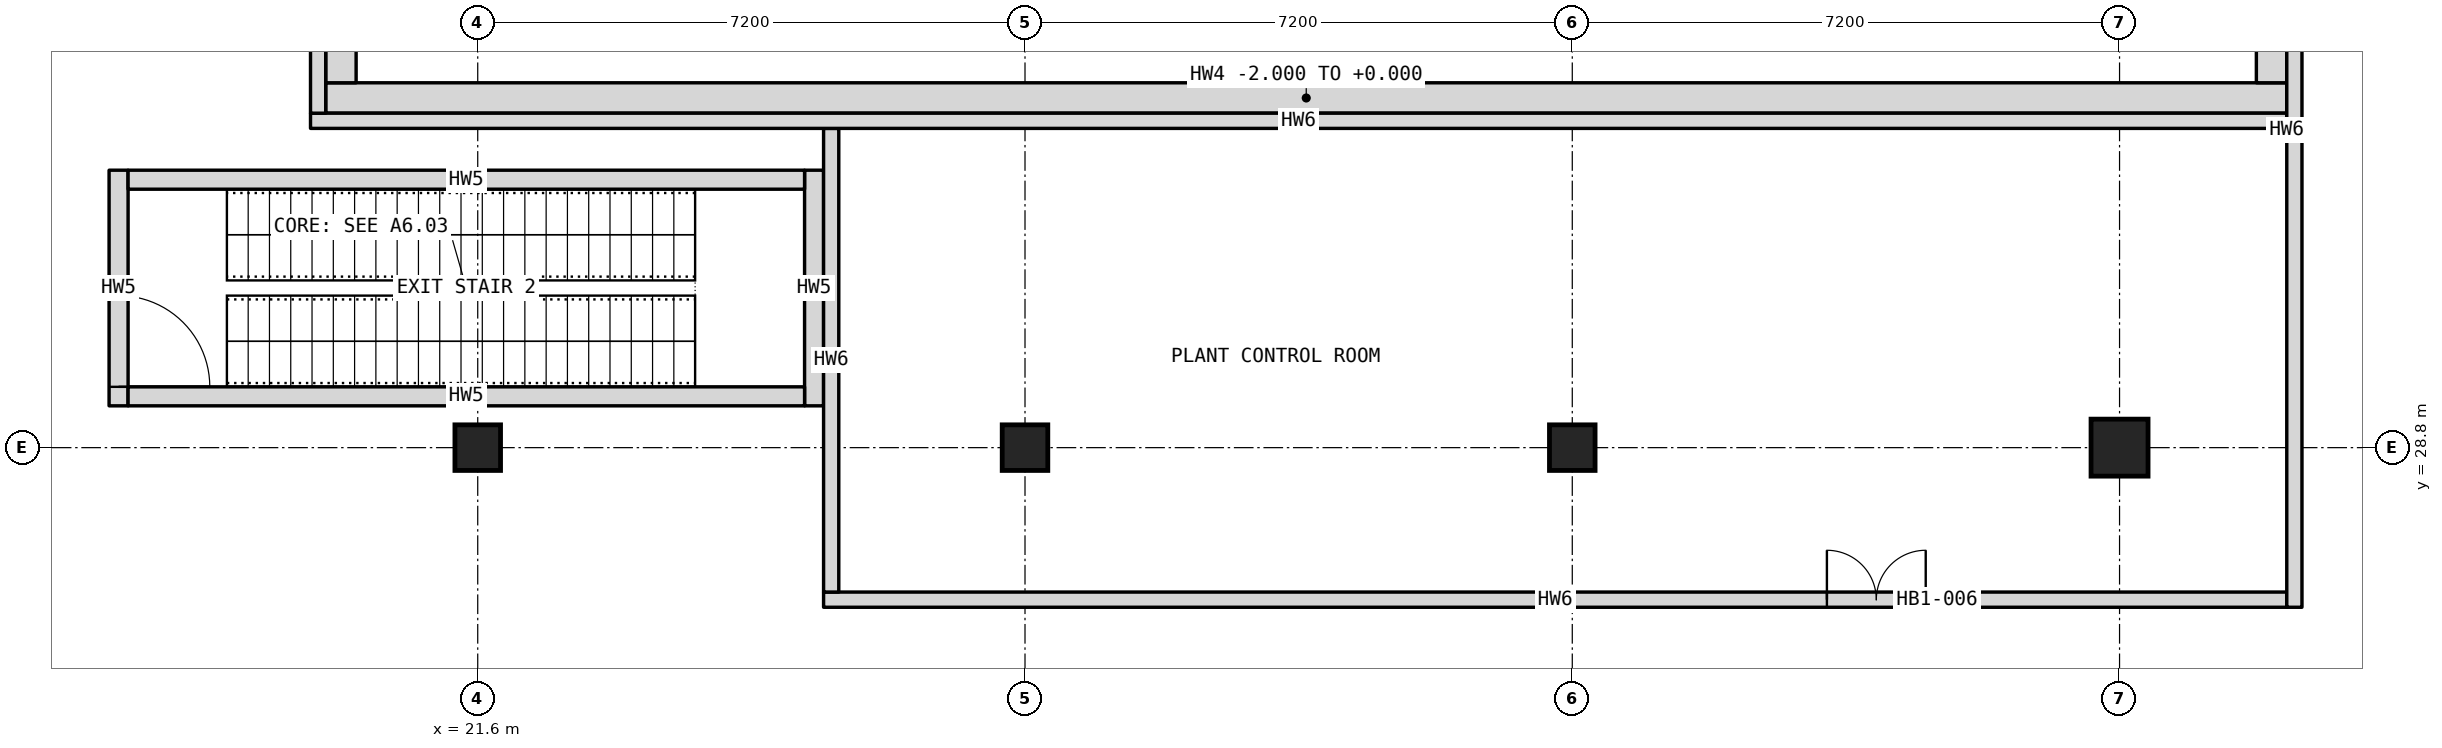
"""IFC4 building model, lengths in metres.
Left out: names, types, materials, properties, quantities, classifications, styles, units other than length and angle.
Written with IfcOpenShell. Run it as: python <this file> out.ifc"""

import sys

from ifc_helpers import new_model, si_unit, direction, frame, frame_2d, origin, origin_2d, place, context, subcontext, project, spatial, rectangle, extrude, element, fill, save


model = new_model("IFC4")
c1 = context("Model", 3, precision=1e-05, world=origin(), true_north=direction((0.0, 1.0)))
c2 = subcontext(c1, "Body", "Model", "MODEL_VIEW")
j1 = project(units=[si_unit("LENGTHUNIT", "METRE"), si_unit("PLANEANGLEUNIT", "RADIAN")], contexts=[c1])
p1 = place(None, origin())
s1 = spatial("IfcSite", under=j1, at=p1, CompositionType="ELEMENT")
p2 = place(p1, origin())
s2 = spatial("IfcBuilding", under=s1, at=p2, CompositionType="ELEMENT")
p3 = place(p2, frame((0.0, 0.0, -8.0)))
s3 = spatial("IfcBuildingStorey", under=s2, at=p3, CompositionType="ELEMENT", Elevation=-8.0)
for number, where, z_axis, x_axis in (
    (1, (21.6, 28.8, 0.0), (0.0, 0.0, 1.0), (1.0, 0.0, 0.0)),
    (2, (28.8, 28.8, 0.0), (0.0, 0.0, 1.0), (1.0, 0.0, 0.0)),
    (3, (36.0, 28.8, 0.0), (0.0, 0.0, 1.0), (1.0, 0.0, 0.0)),
):
    element("IfcColumn", number, at=place(p3, frame(where, z_axis=z_axis, x_axis=x_axis)), inside=s3, PredefinedType="COLUMN", context=c2, shape_type="SweptSolid", body=[
        extrude(rectangle(XDim=0.6, YDim=0.6, at=origin_2d()), origin(), (0.0, 0.0, 1.0), 7.595),
    ])
p4 = place(p3, frame((43.2, 28.8, 0.0), z_axis=(0.0, 0.0, 1.0), x_axis=(1.0, 0.0, 0.0)))
e4 = element("IfcColumn", 4, at=p4, inside=s3, PredefinedType="COLUMN", context=c2, shape_type="SweptSolid", body=[
    extrude(rectangle(XDim=0.75, YDim=0.75, at=origin_2d()), origin(), (0.0, 0.0, 1.0), 7.595),
])
p5 = place(p3, frame((19.6, 33.4, 6.0), z_axis=(0.0, 0.0, 1.0), x_axis=(1.0, 0.0, 0.0)))
e5 = element("IfcWall", 5, at=p5, inside=s3, PredefinedType="SOLIDWALL", context=c2, shape_type="SweptSolid", body=[
    extrude(rectangle(XDim=25.8, YDim=0.4, at=frame_2d((12.9, 0.0))), origin(), (0.0, 0.0, 1.0), 2.0),
])
for number, where, z_axis, x_axis in (
    (6, (19.8, 33.6, 6.0), (0.0, 0.0, 1.0), (0.0, 1.0, 0.0)),
    (7, (45.2, 33.6, 6.0), (0.0, 0.0, 1.0), (0.0, 1.0, 0.0)),
):
    element("IfcWall", number, at=place(p3, frame(where, z_axis=z_axis, x_axis=x_axis)), inside=s3, PredefinedType="SOLIDWALL", context=c2, shape_type="SweptSolid", body=[
        extrude(rectangle(XDim=20.0, YDim=0.4, at=frame_2d((10.0, 0.0))), origin(), (0.0, 0.0, 1.0), 2.0),
    ])
p6 = place(p3, frame((16.875, 29.35, 0.0), z_axis=(0.0, 0.0, 1.0), x_axis=(0.0, 1.0, 0.0)))
e8 = element("IfcWall", 8, at=p6, inside=s3, PredefinedType="SOLIDWALL", context=c2, shape_type="SweptSolid", body=[
    extrude(rectangle(XDim=3.1, YDim=0.25, at=frame_2d((1.55, 0.0))), origin(), (0.0, 0.0, 1.0), 7.595),
])
p7 = place(p6, frame((0.25, 0.0, 0.0)))
e9 = element("IfcOpeningElement", 9, at=p7, cuts=e8, PredefinedType="OPENING", context=c2, shape_type="SweptSolid", body=[
    extrude(rectangle(XDim=1.2, YDim=2.1, at=frame_2d((0.6, 1.05))), frame((0.0, 0.135, 0.0), z_axis=(0.0, -1.0, 0.0), x_axis=(1.0, 0.0, 0.0)), (0.0, 0.0, 1.0), 0.27),
])
p8 = place(p3, frame((26.025, 29.35, 0.0), z_axis=(0.0, 0.0, 1.0), x_axis=(0.0, 1.0, 0.0)))
e10 = element("IfcWall", 10, at=p8, inside=s3, PredefinedType="SOLIDWALL", context=c2, shape_type="SweptSolid", body=[
    extrude(rectangle(XDim=3.1, YDim=0.25, at=frame_2d((1.55, 0.0))), origin(), (0.0, 0.0, 1.0), 7.595),
])
for number, where, z_axis, x_axis in (
    (11, (17.0, 29.475, 0.0), (0.0, 0.0, 1.0), (1.0, 0.0, 0.0)),
    (12, (17.0, 32.325, 0.0), (0.0, 0.0, 1.0), (1.0, 0.0, 0.0)),
):
    element("IfcWall", number, at=place(p3, frame(where, z_axis=z_axis, x_axis=x_axis)), inside=s3, PredefinedType="SOLIDWALL", context=c2, shape_type="SweptSolid", body=[
        extrude(rectangle(XDim=8.9, YDim=0.25, at=frame_2d((4.45, 0.0))), origin(), (0.0, 0.0, 1.0), 7.595),
    ])
p9 = place(p3, frame((26.15, 26.8, 0.0), z_axis=(0.0, 0.0, 1.0), x_axis=(1.0, 0.0, 0.0)))
e13 = element("IfcWall", 13, at=p9, inside=s3, PredefinedType="PARTITIONING", context=c2, shape_type="SweptSolid", body=[
    extrude(rectangle(XDim=19.25, YDim=0.2, at=frame_2d((9.625, 0.0))), origin(), (0.0, 0.0, 1.0), 7.595),
])
p10 = place(p9, frame((13.2, 0.0, 0.0)))
e14 = element("IfcOpeningElement", 14, at=p10, cuts=e13, PredefinedType="OPENING", context=c2, shape_type="SweptSolid", body=[
    extrude(rectangle(XDim=1.3, YDim=2.1, at=frame_2d((0.65, 1.05))), frame((0.0, 0.11, 0.0), z_axis=(0.0, -1.0, 0.0), x_axis=(1.0, 0.0, 0.0)), (0.0, 0.0, 1.0), 0.22),
])
p11 = place(p3, frame((26.25, 26.9, 0.0), z_axis=(0.0, 0.0, 1.0), x_axis=(0.0, 1.0, 0.0)))
e15 = element("IfcWall", 15, at=p11, inside=s3, PredefinedType="PARTITIONING", context=c2, shape_type="SweptSolid", body=[
    extrude(rectangle(XDim=6.1, YDim=0.2, at=frame_2d((3.05, 0.0))), origin(), (0.0, 0.0, 1.0), 7.595),
])
p12 = place(p3, frame((19.4, 33.1, 0.0), z_axis=(0.0, 0.0, 1.0), x_axis=(1.0, 0.0, 0.0)))
e16 = element("IfcWall", 16, at=p12, inside=s3, PredefinedType="PARTITIONING", context=c2, shape_type="SweptSolid", body=[
    extrude(rectangle(XDim=26.0, YDim=0.2, at=frame_2d((13.0, 0.0))), origin(), (0.0, 0.0, 1.0), 7.595),
])
p13 = place(p3, frame((19.5, 33.2, 0.0), z_axis=(0.0, 0.0, 1.0), x_axis=(0.0, 1.0, 0.0)))
e17 = element("IfcWall", 17, at=p13, inside=s3, PredefinedType="PARTITIONING", context=c2, shape_type="SweptSolid", body=[
    extrude(rectangle(XDim=20.8, YDim=0.2, at=frame_2d((10.4, 0.0))), origin(), (0.0, 0.0, 1.0), 7.595),
])
p14 = place(p3, frame((45.5, 26.7, 0.0), z_axis=(0.0, 0.0, 1.0), x_axis=(0.0, 1.0, 0.0)))
e18 = element("IfcWall", 18, at=p14, inside=s3, PredefinedType="PARTITIONING", context=c2, shape_type="SweptSolid", body=[
    extrude(rectangle(XDim=27.5, YDim=0.2, at=frame_2d((13.75, 0.0))), origin(), (0.0, 0.0, 1.0), 7.595),
])
p15 = place(p14, frame((12.4, 0.0, 0.0)))
e19 = element("IfcOpeningElement", 19, at=p15, cuts=e18, PredefinedType="OPENING", context=c2, shape_type="SweptSolid", body=[
    extrude(rectangle(XDim=1.0, YDim=2.1, at=frame_2d((0.5, 1.05))), frame((0.0, 0.11, 0.0), z_axis=(0.0, -1.0, 0.0), x_axis=(1.0, 0.0, 0.0)), (0.0, 0.0, 1.0), 0.22),
])
p16 = place(p14, frame((19.6, 0.0, 0.0)))
e20 = element("IfcOpeningElement", 20, at=p16, cuts=e18, PredefinedType="OPENING", context=c2, shape_type="SweptSolid", body=[
    extrude(rectangle(XDim=1.0, YDim=2.1, at=frame_2d((0.5, 1.05))), frame((0.0, 0.11, 0.0), z_axis=(0.0, -1.0, 0.0), x_axis=(1.0, 0.0, 0.0)), (0.0, 0.0, 1.0), 0.22),
])
p17 = place(p10, origin())
e21 = element("IfcDoor", 21, at=p17, inside=s3, OperationType="DOUBLE_DOOR_SINGLE_SWING", PredefinedType="DOOR", context=c2, shape_type="SweptSolid", body=[
    extrude(rectangle(XDim=1.3, YDim=2.1, at=frame_2d((0.65, 1.05))), frame((0.0, 0.025, 0.0), z_axis=(0.0, -1.0, 0.0), x_axis=(1.0, 0.0, 0.0)), (0.0, 0.0, 1.0), 0.05),
])
fill(e14, e21)
p18 = place(p7, frame((1.2, 0.0, 0.0), z_axis=(0.0, 0.0, 1.0), x_axis=(-1.0, 0.0, 0.0)))
e22 = element("IfcDoor", 22, at=p18, inside=s3, OperationType="SINGLE_SWING_RIGHT", PredefinedType="DOOR", context=c2, shape_type="SweptSolid", body=[
    extrude(rectangle(XDim=1.2, YDim=2.1, at=frame_2d((0.6, 1.05))), frame((0.0, 0.025, 0.0), z_axis=(0.0, -1.0, 0.0), x_axis=(1.0, 0.0, 0.0)), (0.0, 0.0, 1.0), 0.05),
])
fill(e9, e22)
save(model, sys.argv[1])
